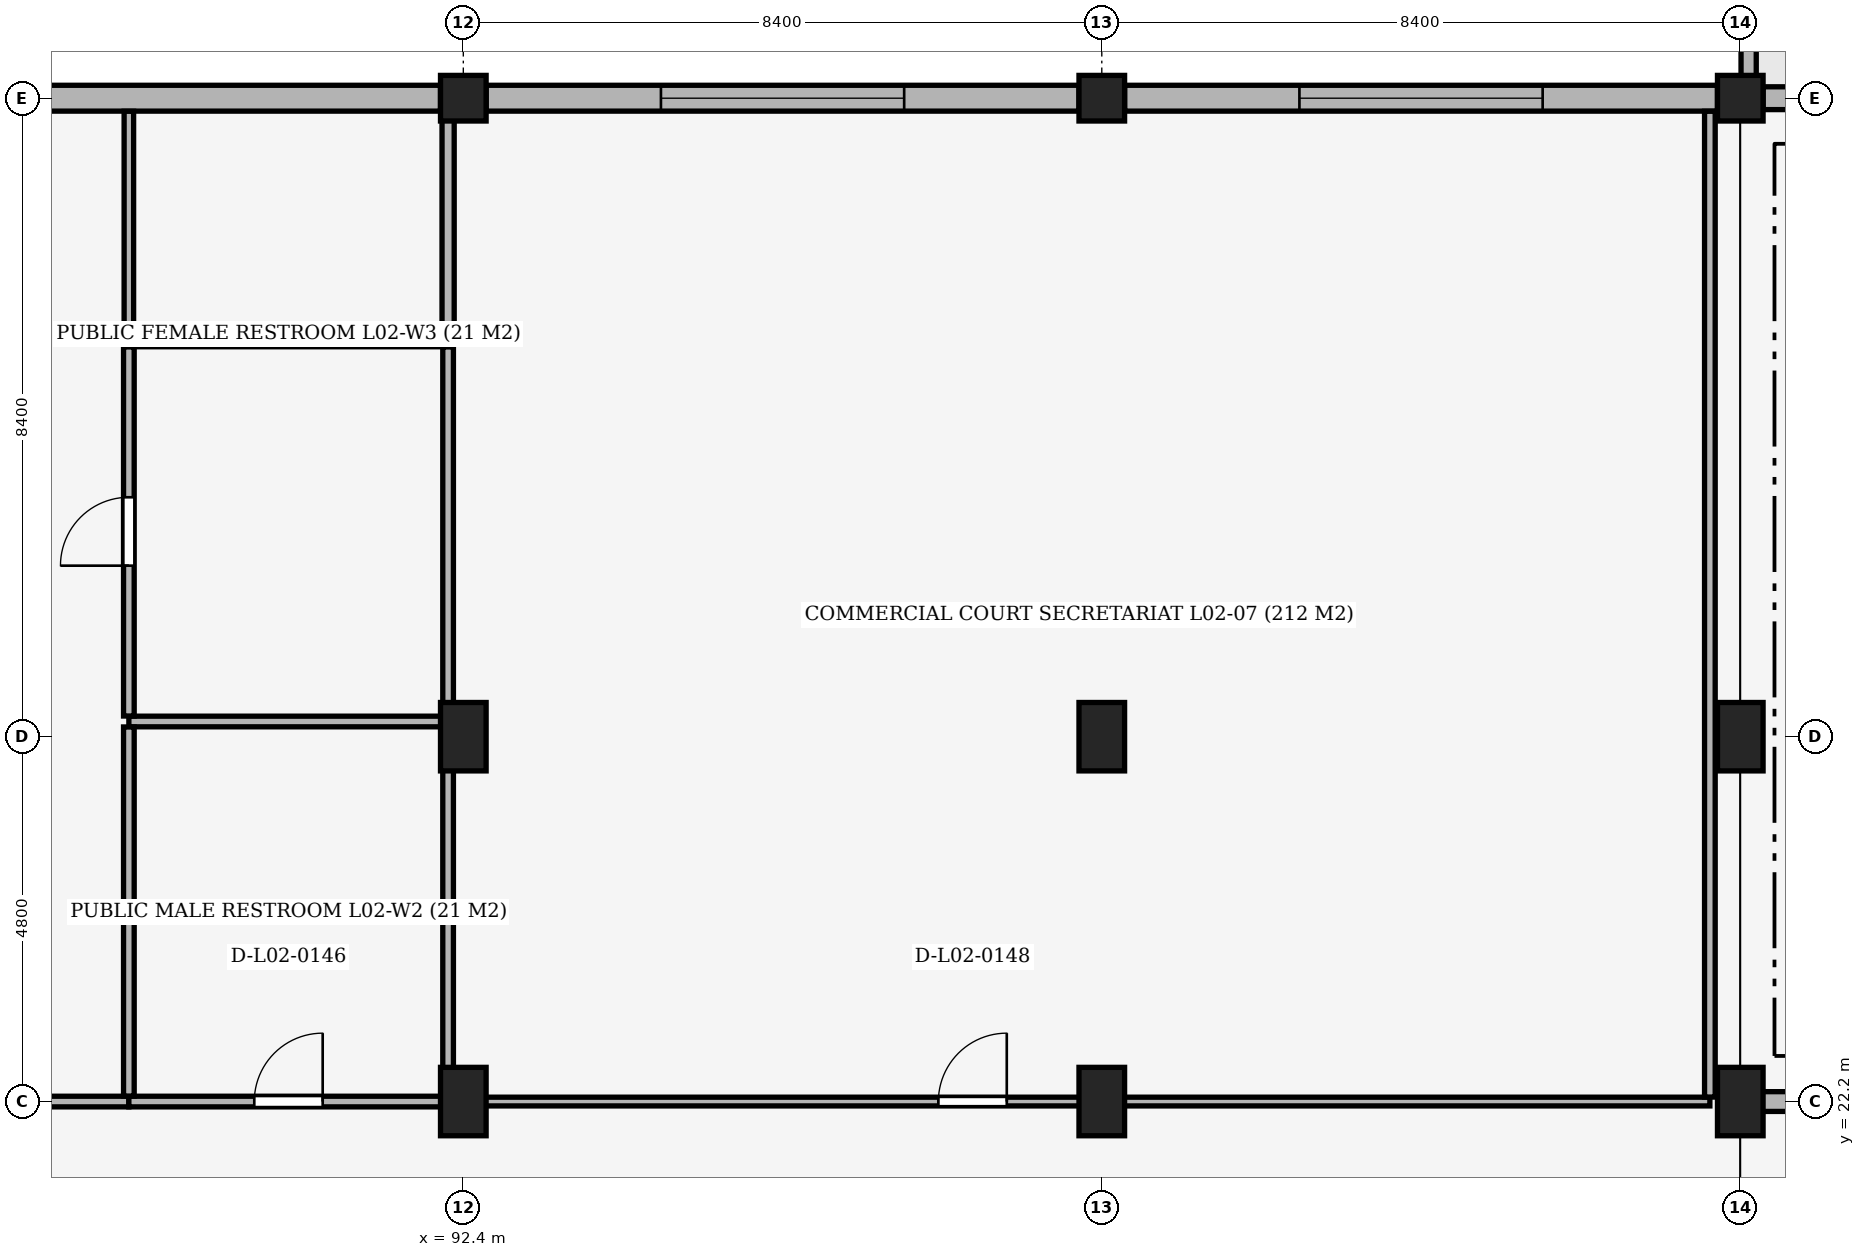
"""IFC4 building model, lengths in metres.
Left out: names, types, materials, properties, quantities, classifications, styles, units other than length and angle.
Written with IfcOpenShell. Run it as: python <this file> out.ifc"""

import sys

from ifc_helpers import new_model, si_unit, direction, frame, frame_2d, origin, origin_2d, place, context, subcontext, project, spatial, rectangle, extrude, element, fill, save


model = new_model("IFC4")
c1 = context("Model", 3, precision=1e-05, world=origin(), true_north=direction((0.0, 1.0)))
c2 = subcontext(c1, "Body", "Model", "MODEL_VIEW")
j1 = project(units=[si_unit("LENGTHUNIT", "METRE"), si_unit("PLANEANGLEUNIT", "RADIAN")], contexts=[c1])
p1 = place(None, origin())
s1 = spatial("IfcSite", under=j1, at=p1, CompositionType="ELEMENT")
p2 = place(p1, origin())
s2 = spatial("IfcBuilding", under=s1, at=p2, CompositionType="ELEMENT")
p3 = place(p2, frame((0.0, 0.0, 10.2)))
s3 = spatial("IfcBuildingStorey", under=s2, at=p3, CompositionType="ELEMENT", Elevation=10.2)
for number, where, z_axis, x_axis in (
    (1, (92.4, 22.2, 0.0), (0.0, 0.0, 1.0), (1.0, 0.0, 0.0)),
    (2, (92.4, 27.0, 0.0), (0.0, 0.0, 1.0), (1.0, 0.0, 0.0)),
):
    element("IfcColumn", number, at=place(p3, frame(where, z_axis=z_axis, x_axis=x_axis)), inside=s3, PredefinedType="COLUMN", context=c2, shape_type="SweptSolid", body=[
        extrude(rectangle(XDim=0.6, YDim=0.9, at=origin_2d()), origin(), (0.0, 0.0, 1.0), 5.1),
    ])
p4 = place(p3, frame((92.4, 35.4, 0.0), z_axis=(0.0, 0.0, 1.0), x_axis=(1.0, 0.0, 0.0)))
e3 = element("IfcColumn", 3, at=p4, inside=s3, PredefinedType="COLUMN", context=c2, shape_type="SweptSolid", body=[
    extrude(rectangle(XDim=0.6, YDim=0.6, at=origin_2d()), origin(), (0.0, 0.0, 1.0), 5.1),
])
for number, where, z_axis, x_axis in (
    (4, (100.8, 22.2, 0.0), (0.0, 0.0, 1.0), (1.0, 0.0, 0.0)),
    (5, (100.8, 27.0, 0.0), (0.0, 0.0, 1.0), (1.0, 0.0, 0.0)),
):
    element("IfcColumn", number, at=place(p3, frame(where, z_axis=z_axis, x_axis=x_axis)), inside=s3, PredefinedType="COLUMN", context=c2, shape_type="SweptSolid", body=[
        extrude(rectangle(XDim=0.6, YDim=0.9, at=origin_2d()), origin(), (0.0, 0.0, 1.0), 5.1),
    ])
p5 = place(p3, frame((100.8, 35.4, 0.0), z_axis=(0.0, 0.0, 1.0), x_axis=(1.0, 0.0, 0.0)))
e6 = element("IfcColumn", 6, at=p5, inside=s3, PredefinedType="COLUMN", context=c2, shape_type="SweptSolid", body=[
    extrude(rectangle(XDim=0.6, YDim=0.6, at=origin_2d()), origin(), (0.0, 0.0, 1.0), 5.1),
])
for number, where, z_axis, x_axis in (
    (7, (109.2, 22.2, 0.0), (0.0, 0.0, 1.0), (1.0, 0.0, 0.0)),
    (8, (109.2, 27.0, 0.0), (0.0, 0.0, 1.0), (1.0, 0.0, 0.0)),
):
    element("IfcColumn", number, at=place(p3, frame(where, z_axis=z_axis, x_axis=x_axis)), inside=s3, PredefinedType="COLUMN", context=c2, shape_type="SweptSolid", body=[
        extrude(rectangle(XDim=0.6, YDim=0.9, at=origin_2d()), origin(), (0.0, 0.0, 1.0), 5.1),
    ])
p6 = place(p3, frame((109.2, 35.4, 0.0), z_axis=(0.0, 0.0, 1.0), x_axis=(1.0, 0.0, 0.0)))
e9 = element("IfcColumn", 9, at=p6, inside=s3, PredefinedType="COLUMN", context=c2, shape_type="SweptSolid", body=[
    extrude(rectangle(XDim=0.6, YDim=0.6, at=origin_2d()), origin(), (0.0, 0.0, 1.0), 5.1),
])
p7 = place(p3, frame((84.3, 35.4, 0.0), z_axis=(0.0, 0.0, 1.0), x_axis=(1.0, 0.0, 0.0)))
e10 = element("IfcWall", 10, at=p7, inside=s3, PredefinedType="SOLIDWALL", context=c2, shape_type="SweptSolid", body=[
    extrude(rectangle(XDim=7.8, YDim=0.34, at=frame_2d((3.9, 0.0))), origin(), (0.0, 0.0, 1.0), 4.12),
])
p8 = place(p3, frame((92.7, 35.4, 0.0), z_axis=(0.0, 0.0, 1.0), x_axis=(1.0, 0.0, 0.0)))
e11 = element("IfcWall", 11, at=p8, inside=s3, PredefinedType="SOLIDWALL", context=c2, shape_type="SweptSolid", body=[
    extrude(rectangle(XDim=7.8, YDim=0.34, at=frame_2d((3.9, 0.0))), origin(), (0.0, 0.0, 1.0), 4.12),
])
p9 = place(p8, frame((2.3, 0.0, 0.75)))
e12 = element("IfcOpeningElement", 12, at=p9, cuts=e11, PredefinedType="OPENING", context=c2, shape_type="SweptSolid", body=[
    extrude(rectangle(XDim=3.2, YDim=2.6, at=frame_2d((1.6, 1.3))), frame((0.0, 0.185, 0.0), z_axis=(0.0, -1.0, 0.0), x_axis=(1.0, 0.0, 0.0)), (0.0, 0.0, 1.0), 0.37),
])
p10 = place(p3, frame((101.1, 35.4, 0.0), z_axis=(0.0, 0.0, 1.0), x_axis=(1.0, 0.0, 0.0)))
e13 = element("IfcWall", 13, at=p10, inside=s3, PredefinedType="SOLIDWALL", context=c2, shape_type="SweptSolid", body=[
    extrude(rectangle(XDim=7.8, YDim=0.34, at=frame_2d((3.9, 0.0))), origin(), (0.0, 0.0, 1.0), 4.12),
])
p11 = place(p10, frame((2.3, 0.0, 0.75)))
e14 = element("IfcOpeningElement", 14, at=p11, cuts=e13, PredefinedType="OPENING", context=c2, shape_type="SweptSolid", body=[
    extrude(rectangle(XDim=3.2, YDim=2.6, at=frame_2d((1.6, 1.3))), frame((0.0, 0.185, 0.0), z_axis=(0.0, -1.0, 0.0), x_axis=(1.0, 0.0, 0.0)), (0.0, 0.0, 1.0), 0.37),
])
p12 = place(p3, frame((109.5, 35.4, 0.0), z_axis=(0.0, 0.0, 1.0), x_axis=(1.0, 0.0, 0.0)))
e15 = element("IfcWall", 15, at=p12, inside=s3, PredefinedType="SOLIDWALL", context=c2, shape_type="SweptSolid", body=[
    extrude(rectangle(XDim=7.85, YDim=0.3, at=frame_2d((3.925, 0.0))), origin(), (0.0, 0.0, 1.0), 4.12),
])
p13 = place(p12, frame((1.217, 0.0, 0.9)))
e16 = element("IfcOpeningElement", 16, at=p13, cuts=e15, PredefinedType="OPENING", context=c2, shape_type="SweptSolid", body=[
    extrude(rectangle(XDim=2.1, YDim=2.1, at=frame_2d((1.05, 1.05))), frame((0.0, 0.165, 0.0), z_axis=(0.0, -1.0, 0.0), x_axis=(1.0, 0.0, 0.0)), (0.0, 0.0, 1.0), 0.33),
])
p14 = place(p12, frame((4.533, 0.0, 0.9)))
e17 = element("IfcOpeningElement", 17, at=p14, cuts=e15, PredefinedType="OPENING", context=c2, shape_type="SweptSolid", body=[
    extrude(rectangle(XDim=2.1, YDim=2.1, at=frame_2d((1.05, 1.05))), frame((0.0, 0.165, 0.0), z_axis=(0.0, -1.0, 0.0), x_axis=(1.0, 0.0, 0.0)), (0.0, 0.0, 1.0), 0.33),
])
p15 = place(p3, frame((109.31, 40.69, 0.0), z_axis=(0.0, 0.0, 1.0), x_axis=(0.0, -1.0, 0.0)))
e18 = element("IfcWall", 18, at=p15, inside=s3, PredefinedType="PARAPET", context=c2, shape_type="SweptSolid", body=[
    extrude(rectangle(XDim=5.04, YDim=0.2, at=frame_2d((2.52, 0.0))), origin(), (0.0, 0.0, 1.0), 1.15),
])
p16 = place(p3, frame((68.8, 22.2, 0.0), z_axis=(0.0, 0.0, 1.0), x_axis=(1.0, 0.0, 0.0)))
e19 = element("IfcWall", 19, at=p16, inside=s3, PredefinedType="PARTITIONING", context=c2, shape_type="SweptSolid", body=[
    extrude(rectangle(XDim=19.2, YDim=0.14, at=frame_2d((9.6, 0.0))), origin(), (0.0, 0.0, 1.0), 4.12),
])
p17 = place(p16, frame((9.075, 0.0, 0.0)))
e20 = element("IfcOpeningElement", 20, at=p17, cuts=e19, PredefinedType="OPENING", context=c2, shape_type="SweptSolid", body=[
    extrude(rectangle(XDim=1.05, YDim=2.1, at=frame_2d((0.525, 1.05))), frame((0.0, 0.085, 0.0), z_axis=(0.0, -1.0, 0.0), x_axis=(1.0, 0.0, 0.0)), (0.0, 0.0, 1.0), 0.17),
])
p18 = place(p3, frame((88.0, 22.2, 0.0), z_axis=(0.0, 0.0, 1.0), x_axis=(1.0, 0.0, 0.0)))
e21 = element("IfcWall", 21, at=p18, inside=s3, PredefinedType="PARTITIONING", context=c2, shape_type="SweptSolid", body=[
    extrude(rectangle(XDim=4.2, YDim=0.14, at=frame_2d((2.1, 0.0))), origin(), (0.0, 0.0, 1.0), 4.12),
])
p19 = place(p18, frame((1.65, 0.0, 0.0)))
e22 = element("IfcOpeningElement", 22, at=p19, cuts=e21, PredefinedType="OPENING", context=c2, shape_type="SweptSolid", body=[
    extrude(rectangle(XDim=0.9, YDim=2.1, at=frame_2d((0.45, 1.05))), frame((0.0, 0.085, 0.0), z_axis=(0.0, -1.0, 0.0), x_axis=(1.0, 0.0, 0.0)), (0.0, 0.0, 1.0), 0.17),
])
p20 = place(p3, frame((92.2, 22.2, 0.0), z_axis=(0.0, 0.0, 1.0), x_axis=(1.0, 0.0, 0.0)))
e23 = element("IfcWall", 23, at=p20, inside=s3, PredefinedType="PARTITIONING", context=c2, shape_type="SweptSolid", body=[
    extrude(rectangle(XDim=16.6, YDim=0.115, at=frame_2d((8.3, 0.0))), origin(), (0.0, 0.0, 1.0), 4.12),
])
p21 = place(p20, frame((6.45, 0.0, 0.0)))
e24 = element("IfcOpeningElement", 24, at=p21, cuts=e23, PredefinedType="OPENING", context=c2, shape_type="SweptSolid", body=[
    extrude(rectangle(XDim=0.9, YDim=2.2, at=frame_2d((0.45, 1.1))), frame((0.0, 0.072, 0.0), z_axis=(0.0, -1.0, 0.0), x_axis=(1.0, 0.0, 0.0)), (0.0, 0.0, 1.0), 0.145),
])
p22 = place(p3, frame((109.2, 22.2, 0.0), z_axis=(0.0, 0.0, 1.0), x_axis=(1.0, 0.0, 0.0)))
e25 = element("IfcWall", 25, at=p22, inside=s3, PredefinedType="PARTITIONING", context=c2, shape_type="SweptSolid", body=[
    extrude(rectangle(XDim=7.3, YDim=0.26, at=frame_2d((3.65, 0.0))), origin(), (0.0, 0.0, 1.0), 4.12),
])
for number, where, z_axis, x_axis in (
    (26, (88.0, 27.2, 0.0), (0.0, 0.0, 1.0), (1.0, 0.0, 0.0)),
    (27, (88.0, 32.2, 0.0), (0.0, 0.0, 1.0), (1.0, 0.0, 0.0)),
):
    element("IfcWall", number, at=place(p3, frame(where, z_axis=z_axis, x_axis=x_axis)), inside=s3, PredefinedType="PARTITIONING", context=c2, shape_type="SweptSolid", body=[
        extrude(rectangle(XDim=4.2, YDim=0.14, at=frame_2d((2.1, 0.0))), origin(), (0.0, 0.0, 1.0), 4.12),
    ])
p23 = place(p3, frame((88.0, 32.272, 0.0), z_axis=(0.0, 0.0, 1.0), x_axis=(0.0, 1.0, 0.0)))
e28 = element("IfcWall", 28, at=p23, inside=s3, PredefinedType="PARTITIONING", context=c2, shape_type="SweptSolid", body=[
    extrude(rectangle(XDim=2.956, YDim=0.125, at=frame_2d((1.478, 0.0))), origin(), (0.0, 0.0, 1.0), 4.12),
])
p24 = place(p3, frame((88.0, 22.272, 0.0), z_axis=(0.0, 0.0, 1.0), x_axis=(0.0, 1.0, 0.0)))
e29 = element("IfcWall", 29, at=p24, inside=s3, PredefinedType="PARTITIONING", context=c2, shape_type="SweptSolid", body=[
    extrude(rectangle(XDim=4.856, YDim=0.14, at=frame_2d((2.428, 0.0))), origin(), (0.0, 0.0, 1.0), 4.12),
])
p25 = place(p3, frame((88.0, 27.272, 0.0), z_axis=(0.0, 0.0, 1.0), x_axis=(0.0, 1.0, 0.0)))
e30 = element("IfcWall", 30, at=p25, inside=s3, PredefinedType="PARTITIONING", context=c2, shape_type="SweptSolid", body=[
    extrude(rectangle(XDim=4.856, YDim=0.14, at=frame_2d((2.428, 0.0))), origin(), (0.0, 0.0, 1.0), 4.12),
])
p26 = place(p25, frame((1.978, 0.0, 0.0)))
e31 = element("IfcOpeningElement", 31, at=p26, cuts=e30, PredefinedType="OPENING", context=c2, shape_type="SweptSolid", body=[
    extrude(rectangle(XDim=0.9, YDim=2.1, at=frame_2d((0.45, 1.05))), frame((0.0, 0.085, 0.0), z_axis=(0.0, -1.0, 0.0), x_axis=(1.0, 0.0, 0.0)), (0.0, 0.0, 1.0), 0.17),
])
for number, where, z_axis, x_axis in (
    (32, (92.2, 22.272, 0.0), (0.0, 0.0, 1.0), (0.0, 1.0, 0.0)),
    (33, (92.2, 27.272, 0.0), (0.0, 0.0, 1.0), (0.0, 1.0, 0.0)),
):
    element("IfcWall", number, at=place(p3, frame(where, z_axis=z_axis, x_axis=x_axis)), inside=s3, PredefinedType="PARTITIONING", context=c2, shape_type="SweptSolid", body=[
        extrude(rectangle(XDim=4.856, YDim=0.14, at=frame_2d((2.428, 0.0))), origin(), (0.0, 0.0, 1.0), 4.12),
    ])
p27 = place(p3, frame((92.2, 32.272, 0.0), z_axis=(0.0, 0.0, 1.0), x_axis=(0.0, 1.0, 0.0)))
e34 = element("IfcWall", 34, at=p27, inside=s3, PredefinedType="PARTITIONING", context=c2, shape_type="SweptSolid", body=[
    extrude(rectangle(XDim=2.975, YDim=0.16, at=frame_2d((1.488, 0.0))), origin(), (0.0, 0.0, 1.0), 4.12),
])
p28 = place(p3, frame((108.8, 22.259, 0.0), z_axis=(0.0, 0.0, 1.0), x_axis=(0.0, 1.0, 0.0)))
e35 = element("IfcWall", 35, at=p28, inside=s3, PredefinedType="PARTITIONING", context=c2, shape_type="SweptSolid", body=[
    extrude(rectangle(XDim=12.969, YDim=0.14, at=frame_2d((6.484, 0.0))), origin(), (0.0, 0.0, 1.0), 4.12),
])
p29 = place(p9, origin())
e36 = element("IfcWindow", 36, at=p29, inside=s3, PartitioningType="SINGLE_PANEL", PredefinedType="WINDOW", context=c2, shape_type="SweptSolid", body=[
    extrude(rectangle(XDim=3.2, YDim=2.6, at=frame_2d((1.6, 1.3))), frame((0.0, 0.03, 0.0), z_axis=(0.0, -1.0, 0.0), x_axis=(1.0, 0.0, 0.0)), (0.0, 0.0, 1.0), 0.06),
])
fill(e12, e36)
p30 = place(p11, origin())
e37 = element("IfcWindow", 37, at=p30, inside=s3, PartitioningType="SINGLE_PANEL", PredefinedType="WINDOW", context=c2, shape_type="SweptSolid", body=[
    extrude(rectangle(XDim=3.2, YDim=2.6, at=frame_2d((1.6, 1.3))), frame((0.0, 0.03, 0.0), z_axis=(0.0, -1.0, 0.0), x_axis=(1.0, 0.0, 0.0)), (0.0, 0.0, 1.0), 0.06),
])
fill(e14, e37)
p31 = place(p19, origin())
e38 = element("IfcDoor", 38, at=p31, inside=s3, OperationType="SINGLE_SWING_RIGHT", PredefinedType="DOOR", context=c2, shape_type="SweptSolid", body=[
    extrude(rectangle(XDim=0.9, YDim=2.1, at=frame_2d((0.45, 1.05))), frame((0.0, 0.025, 0.0), z_axis=(0.0, -1.0, 0.0), x_axis=(1.0, 0.0, 0.0)), (0.0, 0.0, 1.0), 0.05),
])
fill(e22, e38)
p32 = place(p26, origin())
e39 = element("IfcDoor", 39, at=p32, inside=s3, OperationType="SINGLE_SWING_LEFT", PredefinedType="DOOR", context=c2, shape_type="SweptSolid", body=[
    extrude(rectangle(XDim=0.9, YDim=2.1, at=frame_2d((0.45, 1.05))), frame((0.0, 0.025, 0.0), z_axis=(0.0, -1.0, 0.0), x_axis=(1.0, 0.0, 0.0)), (0.0, 0.0, 1.0), 0.05),
])
fill(e31, e39)
p33 = place(p21, origin())
e40 = element("IfcDoor", 40, at=p33, inside=s3, OperationType="SINGLE_SWING_RIGHT", PredefinedType="DOOR", context=c2, shape_type="SweptSolid", body=[
    extrude(rectangle(XDim=0.9, YDim=2.2, at=frame_2d((0.45, 1.1))), frame((0.0, 0.025, 0.0), z_axis=(0.0, -1.0, 0.0), x_axis=(1.0, 0.0, 0.0)), (0.0, 0.0, 1.0), 0.05),
])
fill(e24, e40)
save(model, sys.argv[1])
